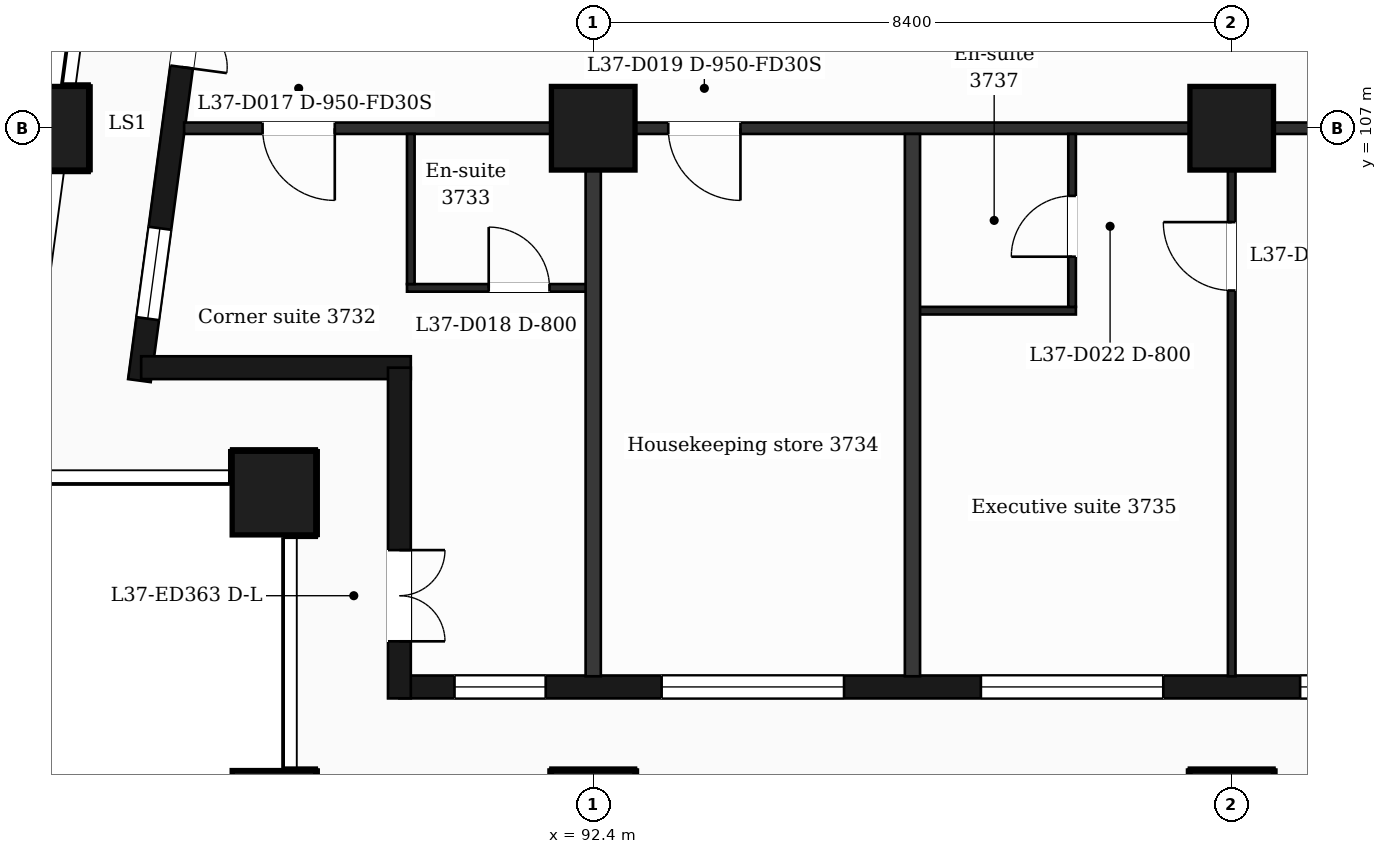
"""IFC4 building model, lengths in metres.
Left out: names, types, materials, properties, quantities, classifications, styles, units other than length and angle.
Written with IfcOpenShell. Run it as: python <this file> out.ifc"""

import sys

from ifc_helpers import new_model, si_unit, direction, frame, frame_2d, origin, origin_2d, place, context, subcontext, project, spatial, rectangle, extrude, element, fill, save


model = new_model("IFC4")
c1 = context("Model", 3, precision=1e-05, world=origin(), true_north=direction((0.0, 1.0)))
c2 = subcontext(c1, "Body", "Model", "MODEL_VIEW")
j1 = project(units=[si_unit("LENGTHUNIT", "METRE"), si_unit("PLANEANGLEUNIT", "RADIAN")], contexts=[c1])
p1 = place(None, origin())
s1 = spatial("IfcSite", under=j1, at=p1, CompositionType="ELEMENT")
p2 = place(p1, origin())
s2 = spatial("IfcBuilding", under=s1, at=p2, CompositionType="ELEMENT")
p3 = place(p2, frame((0.0, 0.0, 158.9)))
s3 = spatial("IfcBuildingStorey", under=s2, at=p3, CompositionType="ELEMENT", Elevation=158.9)
for number, where, z_axis, x_axis in (
    (1, (92.4, 98.0, 0.0), (0.0, 0.0, 1.0), (1.0, 0.0, 0.0)),
    (2, (100.8, 98.0, 0.0), (0.0, 0.0, 1.0), (1.0, 0.0, 0.0)),
    (3, (88.2, 98.0, 0.0), (0.0, 0.0, 1.0), (1.0, 0.0, 0.0)),
    (4, (88.2, 102.2, 0.0), (0.0, 0.0, 1.0), (1.0, 0.0, 0.0)),
    (5, (92.4, 107.0, 0.0), (0.0, 0.0, 1.0), (1.0, 0.0, 0.0)),
    (6, (100.8, 107.0, 0.0), (0.0, 0.0, 1.0), (1.0, 0.0, 0.0)),
    (7, (85.211, 107.0, 0.0), (0.0, 0.0, 1.0), (1.0, 0.0, 0.0)),
):
    element("IfcColumn", number, at=place(p3, frame(where, z_axis=z_axis, x_axis=x_axis)), inside=s3, PredefinedType="COLUMN", context=c2, shape_type="SweptSolid", body=[
        extrude(rectangle(XDim=1.1, YDim=1.1, at=origin_2d()), origin(), (0.0, 0.0, 1.0), 3.7),
    ])
p4 = place(p3, frame((89.85, 99.65, 0.0), z_axis=(0.0, 0.0, 1.0), x_axis=(1.0, 0.0, 0.0)))
e8 = element("IfcWall", 8, at=p4, inside=s3, PredefinedType="SOLIDWALL", context=c2, shape_type="SweptSolid", body=[
    extrude(rectangle(XDim=47.25, YDim=0.3, at=frame_2d((23.625, 0.0))), origin(), (0.0, 0.0, 1.0), 3.38),
])
p5 = place(p4, frame((0.725, 0.0, 0.9)))
e9 = element("IfcOpeningElement", 9, at=p5, cuts=e8, PredefinedType="OPENING", context=c2, shape_type="SweptSolid", body=[
    extrude(rectangle(XDim=1.2, YDim=2.1, at=frame_2d((0.6, 1.05))), frame((0.0, 0.16, 0.0), z_axis=(0.0, -1.0, 0.0), x_axis=(1.0, 0.0, 0.0)), (0.0, 0.0, 1.0), 0.32),
])
p6 = place(p4, frame((3.45, 0.0, 0.9)))
e10 = element("IfcOpeningElement", 10, at=p6, cuts=e8, PredefinedType="OPENING", context=c2, shape_type="SweptSolid", body=[
    extrude(rectangle(XDim=2.4, YDim=2.1, at=frame_2d((1.2, 1.05))), frame((0.0, 0.16, 0.0), z_axis=(0.0, -1.0, 0.0), x_axis=(1.0, 0.0, 0.0)), (0.0, 0.0, 1.0), 0.32),
])
p7 = place(p4, frame((7.65, 0.0, 0.9)))
e11 = element("IfcOpeningElement", 11, at=p7, cuts=e8, PredefinedType="OPENING", context=c2, shape_type="SweptSolid", body=[
    extrude(rectangle(XDim=2.4, YDim=2.1, at=frame_2d((1.2, 1.05))), frame((0.0, 0.16, 0.0), z_axis=(0.0, -1.0, 0.0), x_axis=(1.0, 0.0, 0.0)), (0.0, 0.0, 1.0), 0.32),
])
p8 = place(p4, frame((11.85, 0.0, 0.9)))
e12 = element("IfcOpeningElement", 12, at=p8, cuts=e8, PredefinedType="OPENING", context=c2, shape_type="SweptSolid", body=[
    extrude(rectangle(XDim=2.4, YDim=2.1, at=frame_2d((1.2, 1.05))), frame((0.0, 0.16, 0.0), z_axis=(0.0, -1.0, 0.0), x_axis=(1.0, 0.0, 0.0)), (0.0, 0.0, 1.0), 0.32),
])
p9 = place(p4, frame((16.05, 0.0, 0.9)))
e13 = element("IfcOpeningElement", 13, at=p9, cuts=e8, PredefinedType="OPENING", context=c2, shape_type="SweptSolid", body=[
    extrude(rectangle(XDim=2.4, YDim=2.1, at=frame_2d((1.2, 1.05))), frame((0.0, 0.16, 0.0), z_axis=(0.0, -1.0, 0.0), x_axis=(1.0, 0.0, 0.0)), (0.0, 0.0, 1.0), 0.32),
])
p10 = place(p4, frame((20.25, 0.0, 0.9)))
e14 = element("IfcOpeningElement", 14, at=p10, cuts=e8, PredefinedType="OPENING", context=c2, shape_type="SweptSolid", body=[
    extrude(rectangle(XDim=2.4, YDim=2.1, at=frame_2d((1.2, 1.05))), frame((0.0, 0.16, 0.0), z_axis=(0.0, -1.0, 0.0), x_axis=(1.0, 0.0, 0.0)), (0.0, 0.0, 1.0), 0.32),
])
p11 = place(p4, frame((25.05, 0.0, 0.9)))
e15 = element("IfcOpeningElement", 15, at=p11, cuts=e8, PredefinedType="OPENING", context=c2, shape_type="SweptSolid", body=[
    extrude(rectangle(XDim=1.2, YDim=2.1, at=frame_2d((0.6, 1.05))), frame((0.0, 0.16, 0.0), z_axis=(0.0, -1.0, 0.0), x_axis=(1.0, 0.0, 0.0)), (0.0, 0.0, 1.0), 0.32),
])
p12 = place(p4, frame((29.25, 0.0, 0.9)))
e16 = element("IfcOpeningElement", 16, at=p12, cuts=e8, PredefinedType="OPENING", context=c2, shape_type="SweptSolid", body=[
    extrude(rectangle(XDim=1.2, YDim=2.1, at=frame_2d((0.6, 1.05))), frame((0.0, 0.16, 0.0), z_axis=(0.0, -1.0, 0.0), x_axis=(1.0, 0.0, 0.0)), (0.0, 0.0, 1.0), 0.32),
])
p13 = place(p4, frame((32.55, 0.0, 0.0)))
e17 = element("IfcOpeningElement", 17, at=p13, cuts=e8, PredefinedType="OPENING", context=c2, shape_type="SweptSolid", body=[
    extrude(rectangle(XDim=1.2, YDim=2.4, at=frame_2d((0.6, 1.2))), frame((0.0, 0.16, 0.0), z_axis=(0.0, -1.0, 0.0), x_axis=(1.0, 0.0, 0.0)), (0.0, 0.0, 1.0), 0.32),
])
p14 = place(p4, frame((34.35, 0.0, 0.9)))
e18 = element("IfcOpeningElement", 18, at=p14, cuts=e8, PredefinedType="OPENING", context=c2, shape_type="SweptSolid", body=[
    extrude(rectangle(XDim=1.2, YDim=2.1, at=frame_2d((0.6, 1.05))), frame((0.0, 0.16, 0.0), z_axis=(0.0, -1.0, 0.0), x_axis=(1.0, 0.0, 0.0)), (0.0, 0.0, 1.0), 0.32),
])
p15 = place(p4, frame((37.05, 0.0, 0.9)))
e19 = element("IfcOpeningElement", 19, at=p15, cuts=e8, PredefinedType="OPENING", context=c2, shape_type="SweptSolid", body=[
    extrude(rectangle(XDim=2.4, YDim=2.1, at=frame_2d((1.2, 1.05))), frame((0.0, 0.16, 0.0), z_axis=(0.0, -1.0, 0.0), x_axis=(1.0, 0.0, 0.0)), (0.0, 0.0, 1.0), 0.32),
])
p16 = place(p4, frame((40.95, 0.0, 0.0)))
e20 = element("IfcOpeningElement", 20, at=p16, cuts=e8, PredefinedType="OPENING", context=c2, shape_type="SweptSolid", body=[
    extrude(rectangle(XDim=1.2, YDim=2.4, at=frame_2d((0.6, 1.2))), frame((0.0, 0.16, 0.0), z_axis=(0.0, -1.0, 0.0), x_axis=(1.0, 0.0, 0.0)), (0.0, 0.0, 1.0), 0.32),
])
p17 = place(p4, frame((42.75, 0.0, 0.9)))
e21 = element("IfcOpeningElement", 21, at=p17, cuts=e8, PredefinedType="OPENING", context=c2, shape_type="SweptSolid", body=[
    extrude(rectangle(XDim=1.2, YDim=2.1, at=frame_2d((0.6, 1.05))), frame((0.0, 0.16, 0.0), z_axis=(0.0, -1.0, 0.0), x_axis=(1.0, 0.0, 0.0)), (0.0, 0.0, 1.0), 0.32),
])
p18 = place(p4, frame((45.25, 0.0, 0.9)))
e22 = element("IfcOpeningElement", 22, at=p18, cuts=e8, PredefinedType="OPENING", context=c2, shape_type="SweptSolid", body=[
    extrude(rectangle(XDim=1.2, YDim=2.1, at=frame_2d((0.6, 1.05))), frame((0.0, 0.16, 0.0), z_axis=(0.0, -1.0, 0.0), x_axis=(1.0, 0.0, 0.0)), (0.0, 0.0, 1.0), 0.32),
])
p19 = place(p3, frame((87.334, 110.4, 0.0), z_axis=(0.0, 0.0, 1.0), x_axis=(-0.133437175554, -0.991057273915, 0.0)))
e23 = element("IfcWall", 23, at=p19, inside=s3, PredefinedType="SOLIDWALL", context=c2, shape_type="SweptSolid", body=[
    extrude(rectangle(XDim=6.781, YDim=0.3, at=frame_2d((3.39, 0.0))), origin(), (0.0, 0.0, 1.0), 3.38),
])
p20 = place(p19, frame((1.418, 0.0, 0.0)))
e24 = element("IfcOpeningElement", 24, at=p20, cuts=e23, PredefinedType="OPENING", context=c2, shape_type="SweptSolid", body=[
    extrude(rectangle(XDim=1.2, YDim=2.4, at=frame_2d((0.6, 1.2))), frame((0.0, 0.16, 0.0), z_axis=(0.0, -1.0, 0.0), x_axis=(1.0, 0.0, 0.0)), (0.0, 0.0, 1.0), 0.32),
])
p21 = place(p19, frame((4.758, 0.0, 0.9)))
e25 = element("IfcOpeningElement", 25, at=p21, cuts=e23, PredefinedType="OPENING", context=c2, shape_type="SweptSolid", body=[
    extrude(rectangle(XDim=1.2, YDim=2.1, at=frame_2d((0.6, 1.05))), frame((0.0, 0.16, 0.0), z_axis=(0.0, -1.0, 0.0), x_axis=(1.0, 0.0, 0.0)), (0.0, 0.0, 1.0), 0.32),
])
p22 = place(p3, frame((86.452, 103.85, 0.0), z_axis=(0.0, 0.0, 1.0), x_axis=(1.0, 0.0, 0.0)))
e26 = element("IfcWall", 26, at=p22, inside=s3, PredefinedType="SOLIDWALL", context=c2, shape_type="SweptSolid", body=[
    extrude(rectangle(XDim=3.548, YDim=0.3, at=frame_2d((1.774, 0.0))), origin(), (0.0, 0.0, 1.0), 3.38),
])
p23 = place(p3, frame((89.85, 103.85, 0.0), z_axis=(0.0, 0.0, 1.0), x_axis=(0.0, -1.0, 0.0)))
e27 = element("IfcWall", 27, at=p23, inside=s3, PredefinedType="SOLIDWALL", context=c2, shape_type="SweptSolid", body=[
    extrude(rectangle(XDim=4.35, YDim=0.3, at=frame_2d((2.175, 0.0))), origin(), (0.0, 0.0, 1.0), 3.38),
])
p24 = place(p23, frame((2.4, 0.0, 0.0)))
e28 = element("IfcOpeningElement", 28, at=p24, cuts=e27, PredefinedType="OPENING", context=c2, shape_type="SweptSolid", body=[
    extrude(rectangle(XDim=1.2, YDim=2.4, at=frame_2d((0.6, 1.2))), frame((0.0, 0.16, 0.0), z_axis=(0.0, -1.0, 0.0), x_axis=(1.0, 0.0, 0.0)), (0.0, 0.0, 1.0), 0.32),
])
p25 = place(p3, frame((96.6, 104.6, 0.0), z_axis=(0.0, 0.0, 1.0), x_axis=(1.0, 0.0, 0.0)))
e29 = element("IfcWall", 29, at=p25, inside=s3, PredefinedType="PARTITIONING", context=c2, shape_type="SweptSolid", body=[
    extrude(rectangle(XDim=2.15, YDim=0.1, at=frame_2d((1.075, 0.0))), origin(), (0.0, 0.0, 1.0), 3.38),
])
p26 = place(p3, frame((89.95, 104.9, 0.0), z_axis=(0.0, 0.0, 1.0), x_axis=(1.0, 0.0, 0.0)))
e30 = element("IfcWall", 30, at=p26, inside=s3, PredefinedType="PARTITIONING", context=c2, shape_type="SweptSolid", body=[
    extrude(rectangle(XDim=2.45, YDim=0.1, at=frame_2d((1.225, 0.0))), origin(), (0.0, 0.0, 1.0), 3.38),
])
p27 = place(p26, frame((1.075, 0.0, 0.0)))
e31 = element("IfcOpeningElement", 31, at=p27, cuts=e30, PredefinedType="OPENING", context=c2, shape_type="SweptSolid", body=[
    extrude(rectangle(XDim=0.8, YDim=2.1, at=frame_2d((0.4, 1.05))), frame((0.0, 0.06, 0.0), z_axis=(0.0, -1.0, 0.0), x_axis=(1.0, 0.0, 0.0)), (0.0, 0.0, 1.0), 0.12),
])
p28 = place(p3, frame((87.018, 107.0, 0.0), z_axis=(0.0, 0.0, 1.0), x_axis=(1.0, 0.0, 0.0)))
e32 = element("IfcWall", 32, at=p28, inside=s3, PredefinedType="PARTITIONING", context=c2, shape_type="SweptSolid", body=[
    extrude(rectangle(XDim=52.765, YDim=0.15, at=frame_2d((26.382, 0.0))), origin(), (0.0, 0.0, 1.0), 3.38),
])
p29 = place(p28, frame((1.032, 0.0, 0.0)))
e33 = element("IfcOpeningElement", 33, at=p29, cuts=e32, PredefinedType="OPENING", context=c2, shape_type="SweptSolid", body=[
    extrude(rectangle(XDim=0.95, YDim=2.1, at=frame_2d((0.475, 1.05))), frame((0.0, 0.085, 0.0), z_axis=(0.0, -1.0, 0.0), x_axis=(1.0, 0.0, 0.0)), (0.0, 0.0, 1.0), 0.17),
])
p30 = place(p28, frame((6.369, 0.0, 0.0)))
e34 = element("IfcOpeningElement", 34, at=p30, cuts=e32, PredefinedType="OPENING", context=c2, shape_type="SweptSolid", body=[
    extrude(rectangle(XDim=0.95, YDim=2.1, at=frame_2d((0.475, 1.05))), frame((0.0, 0.085, 0.0), z_axis=(0.0, -1.0, 0.0), x_axis=(1.0, 0.0, 0.0)), (0.0, 0.0, 1.0), 0.17),
])
p31 = place(p28, frame((16.812, 0.0, 0.0)))
e35 = element("IfcOpeningElement", 35, at=p31, cuts=e32, PredefinedType="OPENING", context=c2, shape_type="SweptSolid", body=[
    extrude(rectangle(XDim=1.0, YDim=2.1, at=frame_2d((0.5, 1.05))), frame((0.0, 0.085, 0.0), z_axis=(0.0, -1.0, 0.0), x_axis=(1.0, 0.0, 0.0)), (0.0, 0.0, 1.0), 0.17),
])
p32 = place(p28, frame((25.157, 0.0, 0.0)))
e36 = element("IfcOpeningElement", 36, at=p32, cuts=e32, PredefinedType="OPENING", context=c2, shape_type="SweptSolid", body=[
    extrude(rectangle(XDim=0.95, YDim=2.1, at=frame_2d((0.475, 1.05))), frame((0.0, 0.085, 0.0), z_axis=(0.0, -1.0, 0.0), x_axis=(1.0, 0.0, 0.0)), (0.0, 0.0, 1.0), 0.17),
])
p33 = place(p28, frame((28.867, 0.0, 0.0)))
e37 = element("IfcOpeningElement", 37, at=p33, cuts=e32, PredefinedType="OPENING", context=c2, shape_type="SweptSolid", body=[
    extrude(rectangle(XDim=0.95, YDim=2.1, at=frame_2d((0.475, 1.05))), frame((0.0, 0.085, 0.0), z_axis=(0.0, -1.0, 0.0), x_axis=(1.0, 0.0, 0.0)), (0.0, 0.0, 1.0), 0.17),
])
p34 = place(p28, frame((34.952, 0.0, 0.0)))
e38 = element("IfcOpeningElement", 38, at=p34, cuts=e32, PredefinedType="OPENING", context=c2, shape_type="SweptSolid", body=[
    extrude(rectangle(XDim=1.0, YDim=2.1, at=frame_2d((0.5, 1.05))), frame((0.0, 0.085, 0.0), z_axis=(0.0, -1.0, 0.0), x_axis=(1.0, 0.0, 0.0)), (0.0, 0.0, 1.0), 0.17),
])
p35 = place(p28, frame((45.632, 0.0, 0.0)))
e39 = element("IfcOpeningElement", 39, at=p35, cuts=e32, PredefinedType="OPENING", context=c2, shape_type="SweptSolid", body=[
    extrude(rectangle(XDim=0.95, YDim=2.1, at=frame_2d((0.475, 1.05))), frame((0.0, 0.085, 0.0), z_axis=(0.0, -1.0, 0.0), x_axis=(1.0, 0.0, 0.0)), (0.0, 0.0, 1.0), 0.17),
])
p36 = place(p28, frame((48.56, 0.0, 0.0)))
e40 = element("IfcOpeningElement", 40, at=p36, cuts=e32, PredefinedType="OPENING", context=c2, shape_type="SweptSolid", body=[
    extrude(rectangle(XDim=0.95, YDim=2.1, at=frame_2d((0.475, 1.05))), frame((0.0, 0.085, 0.0), z_axis=(0.0, -1.0, 0.0), x_axis=(1.0, 0.0, 0.0)), (0.0, 0.0, 1.0), 0.17),
])
p37 = place(p3, frame((90.0, 104.95, 0.0), z_axis=(0.0, 0.0, 1.0), x_axis=(0.0, 1.0, 0.0)))
e41 = element("IfcWall", 41, at=p37, inside=s3, PredefinedType="PARTITIONING", context=c2, shape_type="SweptSolid", body=[
    extrude(rectangle(XDim=1.975, YDim=0.1, at=frame_2d((0.988, 0.0))), origin(), (0.0, 0.0, 1.0), 3.38),
])
for number, where, z_axis, x_axis in (
    (42, (92.4, 99.79, 0.0), (0.0, 0.0, 1.0), (0.0, 1.0, 0.0)),
    (43, (96.6, 99.79, 0.0), (0.0, 0.0, 1.0), (0.0, 1.0, 0.0)),
):
    element("IfcWall", number, at=place(p3, frame(where, z_axis=z_axis, x_axis=x_axis)), inside=s3, PredefinedType="PARTITIONING", context=c2, shape_type="SweptSolid", body=[
        extrude(rectangle(XDim=7.135, YDim=0.2, at=frame_2d((3.567, 0.0))), origin(), (0.0, 0.0, 1.0), 3.38),
    ])
p38 = place(p3, frame((98.7, 104.65, 0.0), z_axis=(0.0, 0.0, 1.0), x_axis=(0.0, 1.0, 0.0)))
e44 = element("IfcWall", 44, at=p38, inside=s3, PredefinedType="PARTITIONING", context=c2, shape_type="SweptSolid", body=[
    extrude(rectangle(XDim=2.275, YDim=0.1, at=frame_2d((1.138, 0.0))), origin(), (0.0, 0.0, 1.0), 3.38),
])
p39 = place(p38, frame((0.66, 0.0, 0.0)))
e45 = element("IfcOpeningElement", 45, at=p39, cuts=e44, PredefinedType="OPENING", context=c2, shape_type="SweptSolid", body=[
    extrude(rectangle(XDim=0.8, YDim=2.1, at=frame_2d((0.4, 1.05))), frame((0.0, 0.06, 0.0), z_axis=(0.0, -1.0, 0.0), x_axis=(1.0, 0.0, 0.0)), (0.0, 0.0, 1.0), 0.12),
])
p40 = place(p3, frame((100.8, 99.79, 0.0), z_axis=(0.0, 0.0, 1.0), x_axis=(0.0, 1.0, 0.0)))
e46 = element("IfcWall", 46, at=p40, inside=s3, PredefinedType="PARTITIONING", context=c2, shape_type="SweptSolid", body=[
    extrude(rectangle(XDim=7.135, YDim=0.1, at=frame_2d((3.567, 0.0))), origin(), (0.0, 0.0, 1.0), 3.38),
])
p41 = place(p40, frame((5.075, 0.0, 0.0)))
e47 = element("IfcOpeningElement", 47, at=p41, cuts=e46, PredefinedType="OPENING", context=c2, shape_type="SweptSolid", body=[
    extrude(rectangle(XDim=0.9, YDim=2.1, at=frame_2d((0.45, 1.05))), frame((0.0, 0.06, 0.0), z_axis=(0.0, -1.0, 0.0), x_axis=(1.0, 0.0, 0.0)), (0.0, 0.0, 1.0), 0.12),
])
p42 = place(p5, origin())
e48 = element("IfcWindow", 48, at=p42, inside=s3, PartitioningType="SINGLE_PANEL", PredefinedType="WINDOW", context=c2, shape_type="SweptSolid", body=[
    extrude(rectangle(XDim=1.2, YDim=2.1, at=frame_2d((0.6, 1.05))), frame((0.0, 0.03, 0.0), z_axis=(0.0, -1.0, 0.0), x_axis=(1.0, 0.0, 0.0)), (0.0, 0.0, 1.0), 0.06),
])
fill(e9, e48)
p43 = place(p6, origin())
e49 = element("IfcWindow", 49, at=p43, inside=s3, PartitioningType="SINGLE_PANEL", PredefinedType="WINDOW", context=c2, shape_type="SweptSolid", body=[
    extrude(rectangle(XDim=2.4, YDim=2.1, at=frame_2d((1.2, 1.05))), frame((0.0, 0.03, 0.0), z_axis=(0.0, -1.0, 0.0), x_axis=(1.0, 0.0, 0.0)), (0.0, 0.0, 1.0), 0.06),
])
fill(e10, e49)
p44 = place(p7, origin())
e50 = element("IfcWindow", 50, at=p44, inside=s3, PartitioningType="SINGLE_PANEL", PredefinedType="WINDOW", context=c2, shape_type="SweptSolid", body=[
    extrude(rectangle(XDim=2.4, YDim=2.1, at=frame_2d((1.2, 1.05))), frame((0.0, 0.03, 0.0), z_axis=(0.0, -1.0, 0.0), x_axis=(1.0, 0.0, 0.0)), (0.0, 0.0, 1.0), 0.06),
])
fill(e11, e50)
p45 = place(p8, origin())
e51 = element("IfcWindow", 51, at=p45, inside=s3, PartitioningType="SINGLE_PANEL", PredefinedType="WINDOW", context=c2, shape_type="SweptSolid", body=[
    extrude(rectangle(XDim=2.4, YDim=2.1, at=frame_2d((1.2, 1.05))), frame((0.0, 0.03, 0.0), z_axis=(0.0, -1.0, 0.0), x_axis=(1.0, 0.0, 0.0)), (0.0, 0.0, 1.0), 0.06),
])
fill(e12, e51)
p46 = place(p20, origin())
e52 = element("IfcDoor", 52, at=p46, inside=s3, OperationType="DOUBLE_DOOR_SINGLE_SWING", PredefinedType="DOOR", context=c2, shape_type="SweptSolid", body=[
    extrude(rectangle(XDim=1.2, YDim=2.4, at=frame_2d((0.6, 1.2))), frame((0.0, 0.025, 0.0), z_axis=(0.0, -1.0, 0.0), x_axis=(1.0, 0.0, 0.0)), (0.0, 0.0, 1.0), 0.05),
])
fill(e24, e52)
p47 = place(p21, origin())
e53 = element("IfcWindow", 53, at=p47, inside=s3, PartitioningType="SINGLE_PANEL", PredefinedType="WINDOW", context=c2, shape_type="SweptSolid", body=[
    extrude(rectangle(XDim=1.2, YDim=2.1, at=frame_2d((0.6, 1.05))), frame((0.0, 0.03, 0.0), z_axis=(0.0, -1.0, 0.0), x_axis=(1.0, 0.0, 0.0)), (0.0, 0.0, 1.0), 0.06),
])
fill(e25, e53)
p48 = place(p24, origin())
e54 = element("IfcDoor", 54, at=p48, inside=s3, OperationType="DOUBLE_DOOR_SINGLE_SWING", PredefinedType="DOOR", context=c2, shape_type="SweptSolid", body=[
    extrude(rectangle(XDim=1.2, YDim=2.4, at=frame_2d((0.6, 1.2))), frame((0.0, 0.025, 0.0), z_axis=(0.0, -1.0, 0.0), x_axis=(1.0, 0.0, 0.0)), (0.0, 0.0, 1.0), 0.05),
])
fill(e28, e54)
p49 = place(p29, origin())
e55 = element("IfcDoor", 55, at=p49, inside=s3, OperationType="SINGLE_SWING_RIGHT", PredefinedType="DOOR", context=c2, shape_type="SweptSolid", body=[
    extrude(rectangle(XDim=0.95, YDim=2.1, at=frame_2d((0.475, 1.05))), frame((0.0, 0.025, 0.0), z_axis=(0.0, -1.0, 0.0), x_axis=(1.0, 0.0, 0.0)), (0.0, 0.0, 1.0), 0.05),
])
fill(e33, e55)
p50 = place(p27, origin())
e56 = element("IfcDoor", 56, at=p50, inside=s3, OperationType="SINGLE_SWING_LEFT", PredefinedType="DOOR", context=c2, shape_type="SweptSolid", body=[
    extrude(rectangle(XDim=0.8, YDim=2.1, at=frame_2d((0.4, 1.05))), frame((0.0, 0.025, 0.0), z_axis=(0.0, -1.0, 0.0), x_axis=(1.0, 0.0, 0.0)), (0.0, 0.0, 1.0), 0.05),
])
fill(e31, e56)
p51 = place(p30, origin())
e57 = element("IfcDoor", 57, at=p51, inside=s3, OperationType="SINGLE_SWING_RIGHT", PredefinedType="DOOR", context=c2, shape_type="SweptSolid", body=[
    extrude(rectangle(XDim=0.95, YDim=2.1, at=frame_2d((0.475, 1.05))), frame((0.0, 0.025, 0.0), z_axis=(0.0, -1.0, 0.0), x_axis=(1.0, 0.0, 0.0)), (0.0, 0.0, 1.0), 0.05),
])
fill(e34, e57)
p52 = place(p41, origin())
e58 = element("IfcDoor", 58, at=p52, inside=s3, OperationType="SINGLE_SWING_RIGHT", PredefinedType="DOOR", context=c2, shape_type="SweptSolid", body=[
    extrude(rectangle(XDim=0.9, YDim=2.1, at=frame_2d((0.45, 1.05))), frame((0.0, 0.025, 0.0), z_axis=(0.0, -1.0, 0.0), x_axis=(1.0, 0.0, 0.0)), (0.0, 0.0, 1.0), 0.05),
])
fill(e47, e58)
p53 = place(p39, origin())
e59 = element("IfcDoor", 59, at=p53, inside=s3, OperationType="SINGLE_SWING_LEFT", PredefinedType="DOOR", context=c2, shape_type="SweptSolid", body=[
    extrude(rectangle(XDim=0.8, YDim=2.1, at=frame_2d((0.4, 1.05))), frame((0.0, 0.025, 0.0), z_axis=(0.0, -1.0, 0.0), x_axis=(1.0, 0.0, 0.0)), (0.0, 0.0, 1.0), 0.05),
])
fill(e45, e59)
save(model, sys.argv[1])
